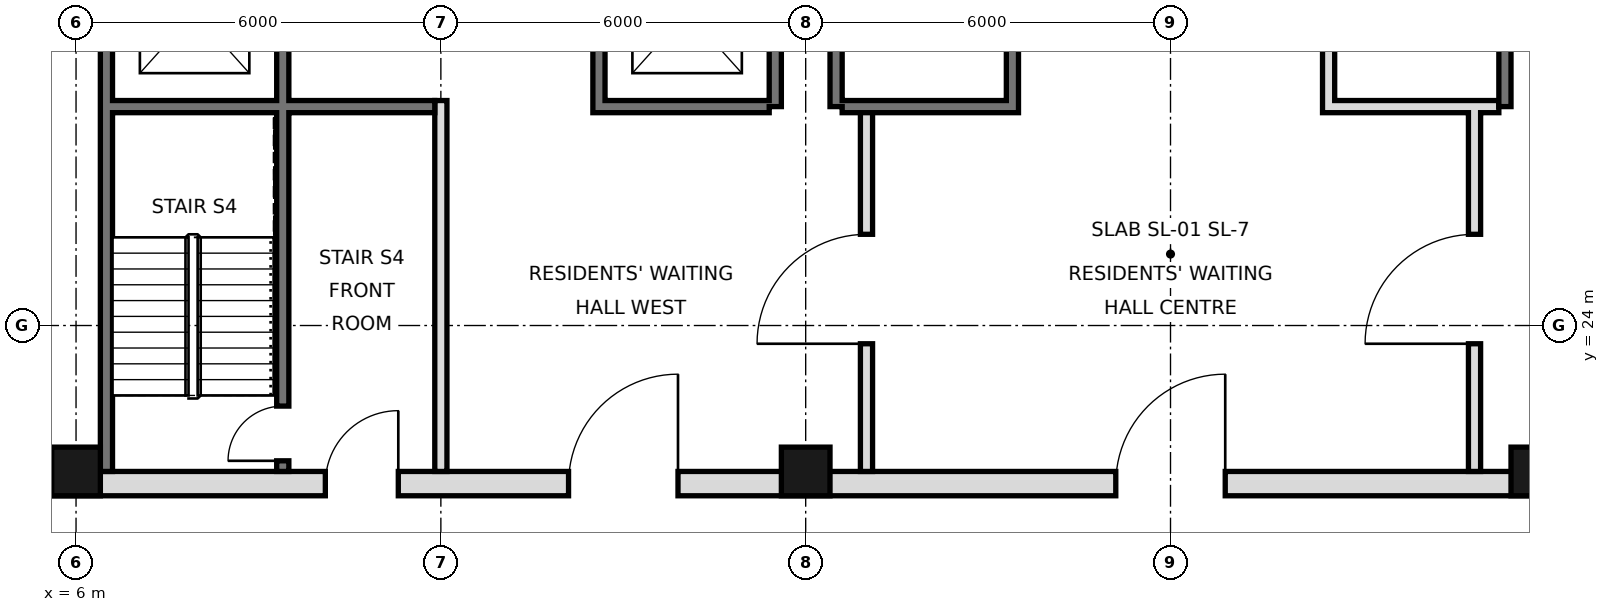
"""IFC4 building model, lengths in metres.
Left out: names, types, materials, properties, quantities, classifications, styles, units other than length and angle.
Written with IfcOpenShell. Run it as: python <this file> out.ifc"""

import sys

from ifc_helpers import new_model, si_unit, direction, frame, frame_2d, origin, origin_2d, place, context, subcontext, project, spatial, rectangle, hollow_rectangle, extrude, element, fill, save


model = new_model("IFC4")
c1 = context("Model", 3, precision=1e-05, world=origin(), true_north=direction((0.0, 1.0)))
c2 = subcontext(c1, "Body", "Model", "MODEL_VIEW")
j1 = project(units=[si_unit("LENGTHUNIT", "METRE"), si_unit("PLANEANGLEUNIT", "RADIAN")], contexts=[c1])
p1 = place(None, origin())
s1 = spatial("IfcSite", under=j1, at=p1, CompositionType="ELEMENT")
p2 = place(p1, origin())
s2 = spatial("IfcBuilding", under=s1, at=p2, CompositionType="ELEMENT")
p3 = place(p2, frame((0.0, 0.0, 60.6)))
s3 = spatial("IfcBuildingStorey", under=s2, at=p3, CompositionType="ELEMENT", Elevation=60.6)
for number, where, z_axis, x_axis in (
    (1, (6.0, 21.6, 0.0), (0.0, 0.0, 1.0), (1.0, 0.0, 0.0)),
    (2, (18.0, 21.6, 0.0), (0.0, 0.0, 1.0), (1.0, 0.0, 0.0)),
    (3, (30.0, 21.6, 0.0), (0.0, 0.0, 1.0), (1.0, 0.0, 0.0)),
):
    element("IfcColumn", number, at=place(p3, frame(where, z_axis=z_axis, x_axis=x_axis)), inside=s3, PredefinedType="COLUMN", context=c2, shape_type="SweptSolid", body=[
        extrude(hollow_rectangle(XDim=0.8, YDim=0.8, WallThickness=0.06, at=origin_2d()), origin(), (0.0, 0.0, 1.0), 3.6),
    ])
p4 = place(p3, frame((6.5, 21.6, 0.0), z_axis=(0.0, 0.0, 1.0), x_axis=(0.0, 1.0, 0.0)))
e4 = element("IfcWall", 4, at=p4, inside=s3, PredefinedType="SOLIDWALL", context=c2, shape_type="SweptSolid", body=[
    extrude(rectangle(XDim=23.5, YDim=0.2, at=frame_2d((11.75, 0.0))), origin(), (0.0, 0.0, 1.0), 3.42),
])
for number, where, z_axis, x_axis in (
    (5, (17.5, 27.6, 0.0), (0.0, 0.0, 1.0), (0.0, 1.0, 0.0)),
    (6, (18.5, 27.6, 0.0), (0.0, 0.0, 1.0), (0.0, 1.0, 0.0)),
    (7, (29.5, 27.6, 0.0), (0.0, 0.0, 1.0), (0.0, 1.0, 0.0)),
):
    element("IfcWall", number, at=place(p3, frame(where, z_axis=z_axis, x_axis=x_axis)), inside=s3, PredefinedType="SOLIDWALL", context=c2, shape_type="SweptSolid", body=[
        extrude(rectangle(XDim=17.5, YDim=0.2, at=frame_2d((8.75, 0.0))), origin(), (0.0, 0.0, 1.0), 3.42),
    ])
p5 = place(p3, frame((5.6, 21.4, 0.0), z_axis=(0.0, 0.0, 1.0), x_axis=(1.0, 0.0, 0.0)))
e8 = element("IfcWall", 8, at=p5, inside=s3, PredefinedType="SOLIDWALL", context=c2, shape_type="SweptSolid", body=[
    extrude(rectangle(XDim=36.8, YDim=0.4, at=frame_2d((18.4, 0.0))), origin(), (0.0, 0.0, 1.0), 3.42),
])
p6 = place(p5, frame((8.5, 0.0, 0.0)))
e9 = element("IfcOpeningElement", 9, at=p6, cuts=e8, PredefinedType="OPENING", context=c2, shape_type="SweptSolid", body=[
    extrude(rectangle(XDim=1.8, YDim=2.1, at=frame_2d((0.9, 1.05))), frame((0.0, 0.21, 0.0), z_axis=(0.0, -1.0, 0.0), x_axis=(1.0, 0.0, 0.0)), (0.0, 0.0, 1.0), 0.42),
])
p7 = place(p5, frame((17.5, 0.0, 0.0)))
e10 = element("IfcOpeningElement", 10, at=p7, cuts=e8, PredefinedType="OPENING", context=c2, shape_type="SweptSolid", body=[
    extrude(rectangle(XDim=1.8, YDim=2.1, at=frame_2d((0.9, 1.05))), frame((0.0, 0.21, 0.0), z_axis=(0.0, -1.0, 0.0), x_axis=(1.0, 0.0, 0.0)), (0.0, 0.0, 1.0), 0.42),
])
p8 = place(p5, frame((26.5, 0.0, 0.0)))
e11 = element("IfcOpeningElement", 11, at=p8, cuts=e8, PredefinedType="OPENING", context=c2, shape_type="SweptSolid", body=[
    extrude(rectangle(XDim=1.8, YDim=2.1, at=frame_2d((0.9, 1.05))), frame((0.0, 0.21, 0.0), z_axis=(0.0, -1.0, 0.0), x_axis=(1.0, 0.0, 0.0)), (0.0, 0.0, 1.0), 0.42),
])
p9 = place(p5, frame((4.5, 0.0, 0.0)))
e12 = element("IfcOpeningElement", 12, at=p9, cuts=e8, PredefinedType="OPENING", context=c2, shape_type="SweptSolid", body=[
    extrude(rectangle(XDim=1.2, YDim=2.1, at=frame_2d((0.6, 1.05))), frame((0.0, 0.21, 0.0), z_axis=(0.0, -1.0, 0.0), x_axis=(1.0, 0.0, 0.0)), (0.0, 0.0, 1.0), 0.42),
])
p10 = place(p5, frame((31.1, 0.0, 0.0)))
e13 = element("IfcOpeningElement", 13, at=p10, cuts=e8, PredefinedType="OPENING", context=c2, shape_type="SweptSolid", body=[
    extrude(rectangle(XDim=1.2, YDim=2.1, at=frame_2d((0.6, 1.05))), frame((0.0, 0.21, 0.0), z_axis=(0.0, -1.0, 0.0), x_axis=(1.0, 0.0, 0.0)), (0.0, 0.0, 1.0), 0.42),
])
p11 = place(p3, frame((19.0, 21.6, 0.0), z_axis=(0.0, 0.0, 1.0), x_axis=(0.0, 1.0, 0.0)))
e14 = element("IfcWall", 14, at=p11, inside=s3, PredefinedType="PARTITIONING", context=c2, shape_type="SweptSolid", body=[
    extrude(rectangle(XDim=6.0, YDim=0.2, at=frame_2d((3.0, 0.0))), origin(), (0.0, 0.0, 1.0), 3.42),
])
p12 = place(p11, frame((2.1, 0.0, 0.0)))
e15 = element("IfcOpeningElement", 15, at=p12, cuts=e14, PredefinedType="OPENING", context=c2, shape_type="SweptSolid", body=[
    extrude(rectangle(XDim=1.8, YDim=2.1, at=frame_2d((0.9, 1.05))), frame((0.0, 0.11, 0.0), z_axis=(0.0, -1.0, 0.0), x_axis=(1.0, 0.0, 0.0)), (0.0, 0.0, 1.0), 0.22),
])
p13 = place(p3, frame((29.0, 21.6, 0.0), z_axis=(0.0, 0.0, 1.0), x_axis=(0.0, 1.0, 0.0)))
e16 = element("IfcWall", 16, at=p13, inside=s3, PredefinedType="PARTITIONING", context=c2, shape_type="SweptSolid", body=[
    extrude(rectangle(XDim=6.0, YDim=0.2, at=frame_2d((3.0, 0.0))), origin(), (0.0, 0.0, 1.0), 3.42),
])
p14 = place(p13, frame((2.1, 0.0, 0.0)))
e17 = element("IfcOpeningElement", 17, at=p14, cuts=e16, PredefinedType="OPENING", context=c2, shape_type="SweptSolid", body=[
    extrude(rectangle(XDim=1.8, YDim=2.1, at=frame_2d((0.9, 1.05))), frame((0.0, 0.11, 0.0), z_axis=(0.0, -1.0, 0.0), x_axis=(1.0, 0.0, 0.0)), (0.0, 0.0, 1.0), 0.22),
])
p15 = place(p3, frame((12.0, 21.6, 0.0), z_axis=(0.0, 0.0, 1.0), x_axis=(0.0, 1.0, 0.0)))
e18 = element("IfcWall", 18, at=p15, inside=s3, PredefinedType="PARTITIONING", context=c2, shape_type="SweptSolid", body=[
    extrude(rectangle(XDim=6.1, YDim=0.2, at=frame_2d((3.05, 0.0))), origin(), (0.0, 0.0, 1.0), 3.42),
])
p16 = place(p3, frame((14.6, 27.5, 0.0), z_axis=(0.0, 0.0, 1.0), x_axis=(0.0, 1.0, 0.0)))
e19 = element("IfcWall", 19, at=p16, inside=s3, PredefinedType="SOLIDWALL", context=c2, shape_type="SweptSolid", body=[
    extrude(rectangle(XDim=17.5, YDim=0.2, at=frame_2d((8.75, 0.0))), origin(), (0.0, 0.0, 1.0), 3.42),
])
p17 = place(p16, frame((1.1, 0.0, 0.0)))
e20 = element("IfcOpeningElement", 20, at=p17, cuts=e19, PredefinedType="OPENING", context=c2, shape_type="SweptSolid", body=[
    extrude(rectangle(XDim=1.1, YDim=2.1, at=frame_2d((0.55, 1.05))), frame((0.0, 0.11, 0.0), z_axis=(0.0, -1.0, 0.0), x_axis=(1.0, 0.0, 0.0)), (0.0, 0.0, 1.0), 0.22),
])
p18 = place(p16, frame((4.2, 0.0, 0.0)))
e21 = element("IfcOpeningElement", 21, at=p18, cuts=e19, PredefinedType="OPENING", context=c2, shape_type="SweptSolid", body=[
    extrude(rectangle(XDim=1.1, YDim=2.1, at=frame_2d((0.55, 1.05))), frame((0.0, 0.11, 0.0), z_axis=(0.0, -1.0, 0.0), x_axis=(1.0, 0.0, 0.0)), (0.0, 0.0, 1.0), 0.22),
])
p19 = place(p16, frame((15.4, 0.0, 0.0)))
e22 = element("IfcOpeningElement", 22, at=p19, cuts=e19, PredefinedType="OPENING", context=c2, shape_type="SweptSolid", body=[
    extrude(rectangle(XDim=1.1, YDim=2.1, at=frame_2d((0.55, 1.05))), frame((0.0, 0.11, 0.0), z_axis=(0.0, -1.0, 0.0), x_axis=(1.0, 0.0, 0.0)), (0.0, 0.0, 1.0), 0.22),
])
p20 = place(p16, frame((9.9, 0.0, 0.0)))
e23 = element("IfcOpeningElement", 23, at=p20, cuts=e19, PredefinedType="OPENING", context=c2, shape_type="SweptSolid", body=[
    extrude(rectangle(XDim=0.9, YDim=2.1, at=frame_2d((0.45, 1.05))), frame((0.0, 0.11, 0.0), z_axis=(0.0, -1.0, 0.0), x_axis=(1.0, 0.0, 0.0)), (0.0, 0.0, 1.0), 0.22),
])
p21 = place(p3, frame((21.4, 27.5, 0.0), z_axis=(0.0, 0.0, 1.0), x_axis=(0.0, 1.0, 0.0)))
e24 = element("IfcWall", 24, at=p21, inside=s3, PredefinedType="SOLIDWALL", context=c2, shape_type="SweptSolid", body=[
    extrude(rectangle(XDim=17.5, YDim=0.2, at=frame_2d((8.75, 0.0))), origin(), (0.0, 0.0, 1.0), 3.42),
])
p22 = place(p21, frame((9.8, 0.0, 0.0)))
e25 = element("IfcOpeningElement", 25, at=p22, cuts=e24, PredefinedType="OPENING", context=c2, shape_type="SweptSolid", body=[
    extrude(rectangle(XDim=1.0, YDim=2.1, at=frame_2d((0.5, 1.05))), frame((0.0, 0.11, 0.0), z_axis=(0.0, -1.0, 0.0), x_axis=(1.0, 0.0, 0.0)), (0.0, 0.0, 1.0), 0.22),
])
p23 = place(p21, frame((7.4, 0.0, 0.0)))
e26 = element("IfcOpeningElement", 26, at=p23, cuts=e24, PredefinedType="OPENING", context=c2, shape_type="SweptSolid", body=[
    extrude(rectangle(XDim=0.9, YDim=2.1, at=frame_2d((0.45, 1.05))), frame((0.0, 0.11, 0.0), z_axis=(0.0, -1.0, 0.0), x_axis=(1.0, 0.0, 0.0)), (0.0, 0.0, 1.0), 0.22),
])
p24 = place(p3, frame((26.6, 27.5, 0.0), z_axis=(0.0, 0.0, 1.0), x_axis=(0.0, 1.0, 0.0)))
e27 = element("IfcWall", 27, at=p24, inside=s3, PredefinedType="SOLIDWALL", context=c2, shape_type="SweptSolid", body=[
    extrude(rectangle(XDim=17.5, YDim=0.2, at=frame_2d((8.75, 0.0))), origin(), (0.0, 0.0, 1.0), 3.42),
])
p25 = place(p24, frame((4.3, 0.0, 0.0)))
e28 = element("IfcOpeningElement", 28, at=p25, cuts=e27, PredefinedType="OPENING", context=c2, shape_type="SweptSolid", body=[
    extrude(rectangle(XDim=0.9, YDim=2.1, at=frame_2d((0.45, 1.05))), frame((0.0, 0.11, 0.0), z_axis=(0.0, -1.0, 0.0), x_axis=(1.0, 0.0, 0.0)), (0.0, 0.0, 1.0), 0.22),
])
p26 = place(p24, frame((10.35, 0.0, 0.0)))
e29 = element("IfcOpeningElement", 29, at=p26, cuts=e27, PredefinedType="OPENING", context=c2, shape_type="SweptSolid", body=[
    extrude(rectangle(XDim=1.0, YDim=2.1, at=frame_2d((0.5, 1.05))), frame((0.0, 0.11, 0.0), z_axis=(0.0, -1.0, 0.0), x_axis=(1.0, 0.0, 0.0)), (0.0, 0.0, 1.0), 0.22),
])
p27 = place(p24, frame((15.475, 0.0, 0.0)))
e30 = element("IfcOpeningElement", 30, at=p27, cuts=e27, PredefinedType="OPENING", context=c2, shape_type="SweptSolid", body=[
    extrude(rectangle(XDim=1.0, YDim=2.1, at=frame_2d((0.5, 1.05))), frame((0.0, 0.11, 0.0), z_axis=(0.0, -1.0, 0.0), x_axis=(1.0, 0.0, 0.0)), (0.0, 0.0, 1.0), 0.22),
])
p28 = place(p3, frame((9.4, 21.6, 0.0), z_axis=(0.0, 0.0, 1.0), x_axis=(0.0, 1.0, 0.0)))
e31 = element("IfcWall", 31, at=p28, inside=s3, PredefinedType="SOLIDWALL", context=c2, shape_type="SweptSolid", body=[
    extrude(rectangle(XDim=23.4, YDim=0.2, at=frame_2d((11.7, 0.0))), origin(), (0.0, 0.0, 1.0), 3.42),
])
p29 = place(p28, frame((7.0, 0.0, 0.0)))
e32 = element("IfcOpeningElement", 32, at=p29, cuts=e31, PredefinedType="OPENING", context=c2, shape_type="SweptSolid", body=[
    extrude(rectangle(XDim=1.1, YDim=2.1, at=frame_2d((0.55, 1.05))), frame((0.0, 0.11, 0.0), z_axis=(0.0, -1.0, 0.0), x_axis=(1.0, 0.0, 0.0)), (0.0, 0.0, 1.0), 0.22),
])
p30 = place(p28, frame((10.1, 0.0, 0.0)))
e33 = element("IfcOpeningElement", 33, at=p30, cuts=e31, PredefinedType="OPENING", context=c2, shape_type="SweptSolid", body=[
    extrude(rectangle(XDim=1.1, YDim=2.1, at=frame_2d((0.55, 1.05))), frame((0.0, 0.11, 0.0), z_axis=(0.0, -1.0, 0.0), x_axis=(1.0, 0.0, 0.0)), (0.0, 0.0, 1.0), 0.22),
])
p31 = place(p28, frame((13.2, 0.0, 0.0)))
e34 = element("IfcOpeningElement", 34, at=p31, cuts=e31, PredefinedType="OPENING", context=c2, shape_type="SweptSolid", body=[
    extrude(rectangle(XDim=1.1, YDim=2.1, at=frame_2d((0.55, 1.05))), frame((0.0, 0.11, 0.0), z_axis=(0.0, -1.0, 0.0), x_axis=(1.0, 0.0, 0.0)), (0.0, 0.0, 1.0), 0.22),
])
p32 = place(p28, frame((15.7, 0.0, 0.0)))
e35 = element("IfcOpeningElement", 35, at=p32, cuts=e31, PredefinedType="OPENING", context=c2, shape_type="SweptSolid", body=[
    extrude(rectangle(XDim=1.0, YDim=2.1, at=frame_2d((0.5, 1.05))), frame((0.0, 0.11, 0.0), z_axis=(0.0, -1.0, 0.0), x_axis=(1.0, 0.0, 0.0)), (0.0, 0.0, 1.0), 0.22),
])
p33 = place(p28, frame((0.175, 0.0, 0.0)))
e36 = element("IfcOpeningElement", 36, at=p33, cuts=e31, PredefinedType="OPENING", context=c2, shape_type="SweptSolid", body=[
    extrude(rectangle(XDim=0.9, YDim=2.1, at=frame_2d((0.45, 1.05))), frame((0.0, 0.11, 0.0), z_axis=(0.0, -1.0, 0.0), x_axis=(1.0, 0.0, 0.0)), (0.0, 0.0, 1.0), 0.22),
])
for number, where, z_axis, x_axis in (
    (37, (14.7, 27.6, 0.0), (0.0, 0.0, 1.0), (1.0, 0.0, 0.0)),
    (38, (18.6, 27.6, 0.0), (0.0, 0.0, 1.0), (1.0, 0.0, 0.0)),
    (39, (26.7, 27.6, 0.0), (0.0, 0.0, 1.0), (1.0, 0.0, 0.0)),
):
    element("IfcWall", number, at=place(p3, frame(where, z_axis=z_axis, x_axis=x_axis)), inside=s3, PredefinedType="SOLIDWALL", context=c2, shape_type="SweptSolid", body=[
        extrude(rectangle(XDim=2.7, YDim=0.2, at=frame_2d((1.35, 0.0))), origin(), (0.0, 0.0, 1.0), 3.42),
    ])
p34 = place(p3, frame((6.6, 27.6, 0.0), z_axis=(0.0, 0.0, 1.0), x_axis=(1.0, 0.0, 0.0)))
e40 = element("IfcWall", 40, at=p34, inside=s3, PredefinedType="SOLIDWALL", context=c2, shape_type="SweptSolid", body=[
    extrude(rectangle(XDim=5.3, YDim=0.2, at=frame_2d((2.65, 0.0))), origin(), (0.0, 0.0, 1.0), 3.42),
])
p35 = place(p6, frame((1.8, 0.0, 0.0), z_axis=(0.0, 0.0, 1.0), x_axis=(-1.0, 0.0, 0.0)))
e41 = element("IfcDoor", 41, at=p35, inside=s3, OperationType="SINGLE_SWING_LEFT", PredefinedType="DOOR", context=c2, shape_type="SweptSolid", body=[
    extrude(rectangle(XDim=1.8, YDim=2.1, at=frame_2d((0.9, 1.05))), frame((0.0, 0.025, 0.0), z_axis=(0.0, -1.0, 0.0), x_axis=(1.0, 0.0, 0.0)), (0.0, 0.0, 1.0), 0.05),
])
fill(e9, e41)
p36 = place(p12, origin())
e42 = element("IfcDoor", 42, at=p36, inside=s3, OperationType="SINGLE_SWING_LEFT", PredefinedType="DOOR", context=c2, shape_type="SweptSolid", body=[
    extrude(rectangle(XDim=1.8, YDim=2.1, at=frame_2d((0.9, 1.05))), frame((0.0, 0.025, 0.0), z_axis=(0.0, -1.0, 0.0), x_axis=(1.0, 0.0, 0.0)), (0.0, 0.0, 1.0), 0.05),
])
fill(e15, e42)
p37 = place(p7, frame((1.8, 0.0, 0.0), z_axis=(0.0, 0.0, 1.0), x_axis=(-1.0, 0.0, 0.0)))
e43 = element("IfcDoor", 43, at=p37, inside=s3, OperationType="SINGLE_SWING_LEFT", PredefinedType="DOOR", context=c2, shape_type="SweptSolid", body=[
    extrude(rectangle(XDim=1.8, YDim=2.1, at=frame_2d((0.9, 1.05))), frame((0.0, 0.025, 0.0), z_axis=(0.0, -1.0, 0.0), x_axis=(1.0, 0.0, 0.0)), (0.0, 0.0, 1.0), 0.05),
])
fill(e10, e43)
p38 = place(p14, origin())
e44 = element("IfcDoor", 44, at=p38, inside=s3, OperationType="SINGLE_SWING_LEFT", PredefinedType="DOOR", context=c2, shape_type="SweptSolid", body=[
    extrude(rectangle(XDim=1.8, YDim=2.1, at=frame_2d((0.9, 1.05))), frame((0.0, 0.025, 0.0), z_axis=(0.0, -1.0, 0.0), x_axis=(1.0, 0.0, 0.0)), (0.0, 0.0, 1.0), 0.05),
])
fill(e17, e44)
p39 = place(p9, frame((1.2, 0.0, 0.0), z_axis=(0.0, 0.0, 1.0), x_axis=(-1.0, 0.0, 0.0)))
e45 = element("IfcDoor", 45, at=p39, inside=s3, OperationType="SINGLE_SWING_LEFT", PredefinedType="DOOR", context=c2, shape_type="SweptSolid", body=[
    extrude(rectangle(XDim=1.2, YDim=2.1, at=frame_2d((0.6, 1.05))), frame((0.0, 0.025, 0.0), z_axis=(0.0, -1.0, 0.0), x_axis=(1.0, 0.0, 0.0)), (0.0, 0.0, 1.0), 0.05),
])
fill(e12, e45)
p40 = place(p33, origin())
e46 = element("IfcDoor", 46, at=p40, inside=s3, OperationType="SINGLE_SWING_LEFT", PredefinedType="DOOR", context=c2, shape_type="SweptSolid", body=[
    extrude(rectangle(XDim=0.9, YDim=2.1, at=frame_2d((0.45, 1.05))), frame((0.0, 0.025, 0.0), z_axis=(0.0, -1.0, 0.0), x_axis=(1.0, 0.0, 0.0)), (0.0, 0.0, 1.0), 0.05),
])
fill(e36, e46)
save(model, sys.argv[1])
